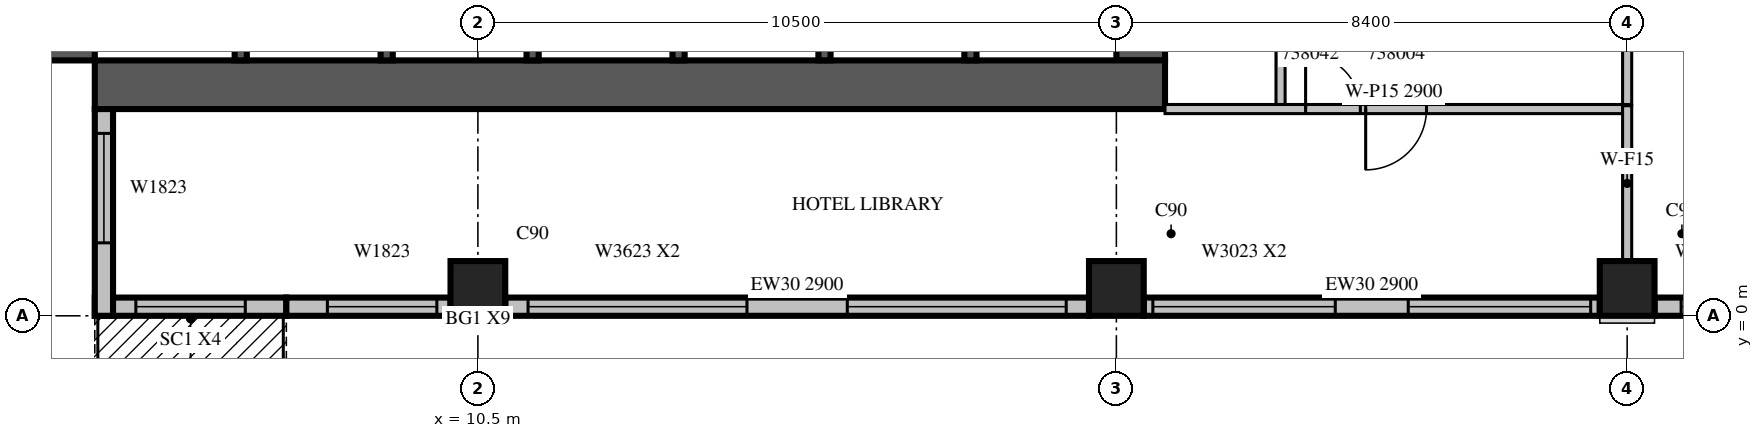
"""IFC4 building model, lengths in metres.
Left out: names, types, materials, properties, quantities, classifications, styles, units other than length and angle.
Written with IfcOpenShell. Run it as: python <this file> out.ifc"""

import sys

from ifc_helpers import new_model, si_unit, direction, frame, frame_2d, origin, origin_2d, place, context, subcontext, project, spatial, rectangle, extrude, source, transform, mapped, element, fill, save


model = new_model("IFC4")
c1 = context("Model", 3, precision=1e-05, world=origin(), true_north=direction((0.0, 1.0)))
c2 = subcontext(c1, "Body", "Model", "MODEL_VIEW")
j1 = project(units=[si_unit("LENGTHUNIT", "METRE"), si_unit("PLANEANGLEUNIT", "RADIAN")], contexts=[c1])
p1 = place(None, origin())
s1 = spatial("IfcSite", under=j1, at=p1, CompositionType="ELEMENT")
p2 = place(p1, origin())
s2 = spatial("IfcBuilding", under=s1, at=p2, CompositionType="ELEMENT")
p3 = place(p2, frame((0.0, 0.0, 177.8)))
s3 = spatial("IfcBuildingStorey", under=s2, at=p3, CompositionType="ELEMENT", Elevation=177.8)
p4 = place(p3, frame((10.5, 0.45, 0.0), z_axis=(0.0, 0.0, 1.0), x_axis=(1.0, 0.0, 0.0)))
e1 = element("IfcColumn", 1, at=p4, inside=s3, PredefinedType="COLUMN", context=c2, shape_type="SweptSolid", body=[
    extrude(rectangle(XDim=0.9, YDim=0.9, at=origin_2d()), origin(), (0.0, 0.0, 1.0), 3.8),
])
m1 = source(origin(), c2, "Body", "SweptSolid", [
    extrude(rectangle(XDim=0.9, YDim=0.9, at=origin_2d()), origin(), (0.0, 0.0, 1.0), 3.8),
])
for number, where, z_axis, x_axis in (
    (2, (21.0, 0.45, 0.0), (0.0, 0.0, 1.0), (1.0, 0.0, 0.0)),
    (3, (29.4, 0.45, 0.0), (0.0, 0.0, 1.0), (1.0, 0.0, 0.0)),
):
    element("IfcColumn", number, at=place(p3, frame(where, z_axis=z_axis, x_axis=x_axis)), inside=s3, PredefinedType="COLUMN", context=c2, shape_type="MappedRepresentation", body=[
        mapped(m1, transform((0.0, 0.0, 0.0), scale=1.0)),
    ])
p5 = place(p3, frame((3.8, 4.2, 0.0), z_axis=(0.0, 0.0, 1.0), x_axis=(0.0, 1.0, 0.0)))
e4 = element("IfcWall", 4, at=p5, inside=s3, PredefinedType="SHEAR", context=c2, shape_type="SweptSolid", body=[
    extrude(rectangle(XDim=17.6, YDim=0.8, at=frame_2d((8.8, 0.0))), origin(), (0.0, 0.0, 1.0), 3.8),
])
m2 = source(origin(), c2, "Body", "SweptSolid", [
    extrude(rectangle(XDim=2.2, YDim=2.1, at=frame_2d((1.1, 1.05))), frame((0.0, 0.41, 0.0), z_axis=(0.0, -1.0, 0.0), x_axis=(1.0, 0.0, 0.0)), (0.0, 0.0, 1.0), 0.82),
])
p6 = place(p5, frame((4.2, 0.0, 0.0)))
e5 = element("IfcOpeningElement", 5, at=p6, cuts=e4, PredefinedType="OPENING", context=c2, shape_type="MappedRepresentation", body=[
    mapped(m2, transform((0.0, 0.0, 0.0), scale=1.0)),
])
p7 = place(p5, frame((10.95, 0.0, 0.0)))
e6 = element("IfcOpeningElement", 6, at=p7, cuts=e4, PredefinedType="OPENING", context=c2, shape_type="SweptSolid", body=[
    extrude(rectangle(XDim=0.9, YDim=2.1, at=frame_2d((0.45, 1.05))), frame((0.0, 0.41, 0.0), z_axis=(0.0, -1.0, 0.0), x_axis=(1.0, 0.0, 0.0)), (0.0, 0.0, 1.0), 0.82),
])
p8 = place(p3, frame((21.4, 4.2, 0.0), z_axis=(0.0, 0.0, 1.0), x_axis=(0.0, 1.0, 0.0)))
e7 = element("IfcWall", 7, at=p8, inside=s3, PredefinedType="SHEAR", context=c2, shape_type="SweptSolid", body=[
    extrude(rectangle(XDim=16.8, YDim=0.8, at=frame_2d((8.4, 0.0))), origin(), (0.0, 0.0, 1.0), 3.8),
])
p9 = place(p8, frame((4.2, 0.0, 0.0)))
e8 = element("IfcOpeningElement", 8, at=p9, cuts=e7, PredefinedType="OPENING", context=c2, shape_type="SweptSolid", body=[
    extrude(rectangle(XDim=2.2, YDim=2.1, at=frame_2d((1.1, 1.05))), frame((0.0, 0.41, 0.0), z_axis=(0.0, -1.0, 0.0), x_axis=(1.0, 0.0, 0.0)), (0.0, 0.0, 1.0), 0.82),
])
m3 = source(origin(), c2, "Body", "SweptSolid", [
    extrude(rectangle(XDim=1.2, YDim=2.1, at=frame_2d((0.6, 1.05))), frame((0.0, 0.41, 0.0), z_axis=(0.0, -1.0, 0.0), x_axis=(1.0, 0.0, 0.0)), (0.0, 0.0, 1.0), 0.82),
])
p10 = place(p8, frame((14.7, 0.0, 0.0)))
e9 = element("IfcOpeningElement", 9, at=p10, cuts=e7, PredefinedType="OPENING", context=c2, shape_type="MappedRepresentation", body=[
    mapped(m3, transform((0.0, 0.0, 0.0), scale=1.0)),
])
m4 = source(origin(), c2, "Body", "SweptSolid", [
    extrude(rectangle(XDim=17.6, YDim=0.8, at=frame_2d((8.8, 0.0))), origin(), (0.0, 0.0, 1.0), 3.8),
])
p11 = place(p3, frame((4.2, 3.8, 0.0), z_axis=(0.0, 0.0, 1.0), x_axis=(1.0, 0.0, 0.0)))
e10 = element("IfcWall", 10, at=p11, inside=s3, PredefinedType="SHEAR", context=c2, shape_type="MappedRepresentation", body=[
    mapped(m4, transform((0.0, 0.0, 0.0), scale=1.0)),
])
p12 = place(p3, frame((4.2, 0.15, 0.0), z_axis=(0.0, 0.0, 1.0), x_axis=(1.0, 0.0, 0.0)))
e11 = element("IfcWall", 11, at=p12, inside=s3, PredefinedType="STANDARD", context=c2, shape_type="SweptSolid", body=[
    extrude(rectangle(XDim=3.15, YDim=0.3, at=frame_2d((1.575, 0.0))), origin(), (0.0, 0.0, 1.0), 3.4),
])
m5 = source(origin(), c2, "Body", "SweptSolid", [
    extrude(rectangle(XDim=1.8, YDim=2.4, at=frame_2d((0.9, 1.2))), frame((0.0, 0.16, 0.0), z_axis=(0.0, -1.0, 0.0), x_axis=(1.0, 0.0, 0.0)), (0.0, 0.0, 1.0), 0.32),
])
p13 = place(p12, frame((0.675, 0.0, 0.0)))
e12 = element("IfcOpeningElement", 12, at=p13, cuts=e11, PredefinedType="OPENING", context=c2, shape_type="MappedRepresentation", body=[
    mapped(m5, transform((0.0, 0.0, 0.0), scale=1.0)),
])
p14 = place(p3, frame((7.35, 0.15, 0.0), z_axis=(0.0, 0.0, 1.0), x_axis=(1.0, 0.0, 0.0)))
e13 = element("IfcWall", 13, at=p14, inside=s3, PredefinedType="STANDARD", context=c2, shape_type="SweptSolid", body=[
    extrude(rectangle(XDim=2.7, YDim=0.3, at=frame_2d((1.35, 0.0))), origin(), (0.0, 0.0, 1.0), 3.4),
])
p15 = place(p14, frame((0.675, 0.0, 0.6)))
e14 = element("IfcOpeningElement", 14, at=p15, cuts=e13, PredefinedType="OPENING", context=c2, shape_type="SweptSolid", body=[
    extrude(rectangle(XDim=1.8, YDim=2.3, at=frame_2d((0.9, 1.15))), frame((0.0, 0.16, 0.0), z_axis=(0.0, -1.0, 0.0), x_axis=(1.0, 0.0, 0.0)), (0.0, 0.0, 1.0), 0.32),
])
p16 = place(p3, frame((10.95, 0.15, 0.0), z_axis=(0.0, 0.0, 1.0), x_axis=(1.0, 0.0, 0.0)))
e15 = element("IfcWall", 15, at=p16, inside=s3, PredefinedType="STANDARD", context=c2, shape_type="SweptSolid", body=[
    extrude(rectangle(XDim=9.6, YDim=0.3, at=frame_2d((4.8, 0.0))), origin(), (0.0, 0.0, 1.0), 2.9),
])
p17 = place(p16, frame((0.375, 0.0, 0.6)))
e16 = element("IfcOpeningElement", 16, at=p17, cuts=e15, PredefinedType="OPENING", context=c2, shape_type="SweptSolid", body=[
    extrude(rectangle(XDim=3.6, YDim=2.3, at=frame_2d((1.8, 1.15))), frame((0.0, 0.16, 0.0), z_axis=(0.0, -1.0, 0.0), x_axis=(1.0, 0.0, 0.0)), (0.0, 0.0, 1.0), 0.32),
])
m6 = source(origin(), c2, "Body", "SweptSolid", [
    extrude(rectangle(XDim=3.6, YDim=2.3, at=frame_2d((1.8, 1.15))), frame((0.0, 0.16, 0.0), z_axis=(0.0, -1.0, 0.0), x_axis=(1.0, 0.0, 0.0)), (0.0, 0.0, 1.0), 0.32),
])
p18 = place(p16, frame((5.625, 0.0, 0.6)))
e17 = element("IfcOpeningElement", 17, at=p18, cuts=e15, PredefinedType="OPENING", context=c2, shape_type="MappedRepresentation", body=[
    mapped(m6, transform((0.0, 0.0, 0.0), scale=1.0)),
])
p19 = place(p3, frame((21.45, 0.15, 0.0), z_axis=(0.0, 0.0, 1.0), x_axis=(1.0, 0.0, 0.0)))
e18 = element("IfcWall", 18, at=p19, inside=s3, PredefinedType="STANDARD", context=c2, shape_type="SweptSolid", body=[
    extrude(rectangle(XDim=7.5, YDim=0.3, at=frame_2d((3.75, 0.0))), origin(), (0.0, 0.0, 1.0), 2.9),
])
p20 = place(p19, frame((0.15, 0.0, 0.6)))
e19 = element("IfcOpeningElement", 19, at=p20, cuts=e18, PredefinedType="OPENING", context=c2, shape_type="SweptSolid", body=[
    extrude(rectangle(XDim=3.0, YDim=2.3, at=frame_2d((1.5, 1.15))), frame((0.0, 0.16, 0.0), z_axis=(0.0, -1.0, 0.0), x_axis=(1.0, 0.0, 0.0)), (0.0, 0.0, 1.0), 0.32),
])
m7 = source(origin(), c2, "Body", "SweptSolid", [
    extrude(rectangle(XDim=3.0, YDim=2.3, at=frame_2d((1.5, 1.15))), frame((0.0, 0.16, 0.0), z_axis=(0.0, -1.0, 0.0), x_axis=(1.0, 0.0, 0.0)), (0.0, 0.0, 1.0), 0.32),
])
p21 = place(p19, frame((4.35, 0.0, 0.6)))
e20 = element("IfcOpeningElement", 20, at=p21, cuts=e18, PredefinedType="OPENING", context=c2, shape_type="MappedRepresentation", body=[
    mapped(m7, transform((0.0, 0.0, 0.0), scale=1.0)),
])
p22 = place(p3, frame((29.85, 0.15, 0.0), z_axis=(0.0, 0.0, 1.0), x_axis=(1.0, 0.0, 0.0)))
e21 = element("IfcWall", 21, at=p22, inside=s3, PredefinedType="STANDARD", context=c2, shape_type="SweptSolid", body=[
    extrude(rectangle(XDim=7.5, YDim=0.3, at=frame_2d((3.75, 0.0))), origin(), (0.0, 0.0, 1.0), 3.4),
])
p23 = place(p22, frame((0.438, 0.0, 0.6)))
e22 = element("IfcOpeningElement", 22, at=p23, cuts=e21, PredefinedType="OPENING", context=c2, shape_type="SweptSolid", body=[
    extrude(rectangle(XDim=1.2, YDim=2.3, at=frame_2d((0.6, 1.15))), frame((0.0, 0.16, 0.0), z_axis=(0.0, -1.0, 0.0), x_axis=(1.0, 0.0, 0.0)), (0.0, 0.0, 1.0), 0.32),
])
m8 = source(origin(), c2, "Body", "SweptSolid", [
    extrude(rectangle(XDim=1.2, YDim=2.3, at=frame_2d((0.6, 1.15))), frame((0.0, 0.16, 0.0), z_axis=(0.0, -1.0, 0.0), x_axis=(1.0, 0.0, 0.0)), (0.0, 0.0, 1.0), 0.32),
])
p24 = place(p22, frame((5.963, 0.0, 0.6)))
e23 = element("IfcOpeningElement", 23, at=p24, cuts=e21, PredefinedType="OPENING", context=c2, shape_type="MappedRepresentation", body=[
    mapped(m8, transform((0.0, 0.0, 0.0), scale=1.0)),
])
m9 = source(origin(), c2, "Body", "SweptSolid", [
    extrude(rectangle(XDim=3.4, YDim=0.3, at=frame_2d((1.7, 0.0))), origin(), (0.0, 0.0, 1.0), 3.4),
])
p25 = place(p3, frame((4.35, 3.4, 0.0), z_axis=(0.0, 0.0, 1.0), x_axis=(0.0, -1.0, 0.0)))
e24 = element("IfcWall", 24, at=p25, inside=s3, PredefinedType="STANDARD", context=c2, shape_type="MappedRepresentation", body=[
    mapped(m9, transform((0.0, 0.0, 0.0), scale=1.0)),
])
m10 = source(origin(), c2, "Body", "SweptSolid", [
    extrude(rectangle(XDim=1.8, YDim=2.3, at=frame_2d((0.9, 1.15))), frame((0.0, 0.16, 0.0), z_axis=(0.0, -1.0, 0.0), x_axis=(1.0, 0.0, 0.0)), (0.0, 0.0, 1.0), 0.32),
])
p26 = place(p25, frame((0.4, 0.0, 0.6)))
e25 = element("IfcOpeningElement", 25, at=p26, cuts=e24, PredefinedType="OPENING", context=c2, shape_type="MappedRepresentation", body=[
    mapped(m10, transform((0.0, 0.0, 0.0), scale=1.0)),
])
p27 = place(p3, frame((6.6, 4.2, 0.0), z_axis=(0.0, 0.0, 1.0), x_axis=(0.0, 1.0, 0.0)))
e26 = element("IfcWall", 26, at=p27, inside=s3, PredefinedType="SOLIDWALL", context=c2, shape_type="SweptSolid", body=[
    extrude(rectangle(XDim=3.1, YDim=0.2, at=frame_2d((1.55, 0.0))), origin(), (0.0, 0.0, 1.0), 3.8),
])
m11 = source(origin(), c2, "Body", "SweptSolid", [
    extrude(rectangle(XDim=3.1, YDim=0.2, at=frame_2d((1.55, 0.0))), origin(), (0.0, 0.0, 1.0), 3.8),
])
for number, where, z_axis, x_axis in (
    (27, (9.0, 4.2, 0.0), (0.0, 0.0, 1.0), (0.0, 1.0, 0.0)),
    (28, (11.4, 4.2, 0.0), (0.0, 0.0, 1.0), (0.0, 1.0, 0.0)),
):
    element("IfcWall", number, at=place(p3, frame(where, z_axis=z_axis, x_axis=x_axis)), inside=s3, PredefinedType="SOLIDWALL", context=c2, shape_type="MappedRepresentation", body=[
        mapped(m11, transform((0.0, 0.0, 0.0), scale=1.0)),
    ])
p28 = place(p3, frame((13.8, 4.2, 0.0), z_axis=(0.0, 0.0, 1.0), x_axis=(0.0, 1.0, 0.0)))
e29 = element("IfcWall", 29, at=p28, inside=s3, PredefinedType="SOLIDWALL", context=c2, shape_type="SweptSolid", body=[
    extrude(rectangle(XDim=3.1, YDim=0.2, at=frame_2d((1.55, 0.0))), origin(), (0.0, 0.0, 1.0), 3.4),
])
m12 = source(origin(), c2, "Body", "SweptSolid", [
    extrude(rectangle(XDim=3.1, YDim=0.2, at=frame_2d((1.55, 0.0))), origin(), (0.0, 0.0, 1.0), 3.4),
])
for number, where, z_axis, x_axis in (
    (30, (16.2, 4.2, 0.0), (0.0, 0.0, 1.0), (0.0, 1.0, 0.0)),
    (31, (18.6, 4.2, 0.0), (0.0, 0.0, 1.0), (0.0, 1.0, 0.0)),
):
    element("IfcWall", number, at=place(p3, frame(where, z_axis=z_axis, x_axis=x_axis)), inside=s3, PredefinedType="SOLIDWALL", context=c2, shape_type="MappedRepresentation", body=[
        mapped(m12, transform((0.0, 0.0, 0.0), scale=1.0)),
    ])
p29 = place(p3, frame((23.7, 15.0, 0.0), z_axis=(0.0, 0.0, 1.0), x_axis=(0.0, -1.0, 0.0)))
e32 = element("IfcWall", 32, at=p29, inside=s3, PredefinedType="PARTITIONING", context=c2, shape_type="SweptSolid", body=[
    extrude(rectangle(XDim=11.525, YDim=0.15, at=frame_2d((5.763, 0.0))), origin(), (0.0, 0.0, 1.0), 2.4),
])
m13 = source(origin(), c2, "Body", "SweptSolid", [
    extrude(rectangle(XDim=0.9, YDim=2.1, at=frame_2d((0.45, 1.05))), frame((0.0, 0.085, 0.0), z_axis=(0.0, -1.0, 0.0), x_axis=(1.0, 0.0, 0.0)), (0.0, 0.0, 1.0), 0.17),
])
p30 = place(p29, frame((9.363, 0.0, 0.0)))
e33 = element("IfcOpeningElement", 33, at=p30, cuts=e32, PredefinedType="OPENING", context=c2, shape_type="MappedRepresentation", body=[
    mapped(m13, transform((0.0, 0.0, 0.0), scale=1.0)),
])
p31 = place(p29, frame((2.725, 0.0, 0.0)))
e34 = element("IfcOpeningElement", 34, at=p31, cuts=e32, PredefinedType="OPENING", context=c2, shape_type="MappedRepresentation", body=[
    mapped(m13, transform((0.0, 0.0, 0.0), scale=1.0)),
])
p32 = place(p3, frame((29.4, 3.475, 0.0), z_axis=(0.0, 0.0, 1.0), x_axis=(0.0, 1.0, 0.0)))
e35 = element("IfcWall", 35, at=p32, inside=s3, PredefinedType="PARTITIONING", context=c2, shape_type="SweptSolid", body=[
    extrude(rectangle(XDim=6.576, YDim=0.15, at=frame_2d((3.288, 0.0))), origin(), (0.0, 0.0, 1.0), 3.4),
])
p33 = place(p3, frame((21.8, 3.4, 0.0), z_axis=(0.0, 0.0, 1.0), x_axis=(1.0, 0.0, 0.0)))
e36 = element("IfcWall", 36, at=p33, inside=s3, PredefinedType="PARTITIONING", context=c2, shape_type="SweptSolid", body=[
    extrude(rectangle(XDim=7.525, YDim=0.15, at=frame_2d((3.763, 0.0))), origin(), (0.0, 0.0, 1.0), 2.9),
])
m14 = source(origin(), c2, "Body", "SweptSolid", [
    extrude(rectangle(XDim=1.0, YDim=2.1, at=frame_2d((0.5, 1.05))), frame((0.0, 0.085, 0.0), z_axis=(0.0, -1.0, 0.0), x_axis=(1.0, 0.0, 0.0)), (0.0, 0.0, 1.0), 0.17),
])
p34 = place(p33, frame((3.3, 0.0, 0.0)))
e37 = element("IfcOpeningElement", 37, at=p34, cuts=e36, PredefinedType="OPENING", context=c2, shape_type="MappedRepresentation", body=[
    mapped(m14, transform((0.0, 0.0, 0.0), scale=1.0)),
])
p35 = place(p33, frame((2.312, 0.0, 0.0)))
e38 = element("IfcOpeningElement", 38, at=p35, cuts=e36, PredefinedType="OPENING", context=c2, shape_type="MappedRepresentation", body=[
    mapped(m13, transform((0.0, 0.0, 0.0), scale=1.0)),
])
p36 = place(p3, frame((29.4, 0.899, 0.0), z_axis=(0.0, 0.0, 1.0), x_axis=(0.0, 1.0, 0.0)))
e39 = element("IfcWall", 39, at=p36, inside=s3, PredefinedType="PARTITIONING", context=c2, shape_type="SweptSolid", body=[
    extrude(rectangle(XDim=2.556, YDim=0.15, at=frame_2d((1.278, 0.0))), origin(), (0.0, 0.0, 1.0), 3.4),
])
m15 = source(origin(), c2, "Body", "SweptSolid", [
    extrude(rectangle(XDim=1.8, YDim=2.4, at=frame_2d((0.9, 1.2))), frame((0.0, 0.025, 0.0), z_axis=(0.0, -1.0, 0.0), x_axis=(1.0, 0.0, 0.0)), (0.0, 0.0, 1.0), 0.05),
])
p37 = place(p13, origin())
e40 = element("IfcDoor", 40, at=p37, inside=s3, OperationType="SLIDING_TO_LEFT", PredefinedType="DOOR", context=c2, shape_type="MappedRepresentation", body=[
    mapped(m15, transform((0.0, 0.0, 0.0), scale=1.0)),
])
fill(e12, e40)
p38 = place(p15, origin())
e41 = element("IfcWindow", 41, at=p38, inside=s3, PartitioningType="SINGLE_PANEL", PredefinedType="WINDOW", context=c2, shape_type="SweptSolid", body=[
    extrude(rectangle(XDim=1.8, YDim=2.3, at=frame_2d((0.9, 1.15))), frame((0.0, 0.03, 0.0), z_axis=(0.0, -1.0, 0.0), x_axis=(1.0, 0.0, 0.0)), (0.0, 0.0, 1.0), 0.06),
])
fill(e14, e41)
p39 = place(p17, origin())
e42 = element("IfcWindow", 42, at=p39, inside=s3, PartitioningType="SINGLE_PANEL", PredefinedType="WINDOW", context=c2, shape_type="SweptSolid", body=[
    extrude(rectangle(XDim=3.6, YDim=2.3, at=frame_2d((1.8, 1.15))), frame((0.0, 0.03, 0.0), z_axis=(0.0, -1.0, 0.0), x_axis=(1.0, 0.0, 0.0)), (0.0, 0.0, 1.0), 0.06),
])
fill(e16, e42)
m16 = source(origin(), c2, "Body", "SweptSolid", [
    extrude(rectangle(XDim=3.6, YDim=2.3, at=frame_2d((1.8, 1.15))), frame((0.0, 0.03, 0.0), z_axis=(0.0, -1.0, 0.0), x_axis=(1.0, 0.0, 0.0)), (0.0, 0.0, 1.0), 0.06),
])
p40 = place(p18, origin())
e43 = element("IfcWindow", 43, at=p40, inside=s3, PartitioningType="SINGLE_PANEL", PredefinedType="WINDOW", context=c2, shape_type="MappedRepresentation", body=[
    mapped(m16, transform((0.0, 0.0, 0.0), scale=1.0)),
])
fill(e17, e43)
p41 = place(p20, origin())
e44 = element("IfcWindow", 44, at=p41, inside=s3, PartitioningType="SINGLE_PANEL", PredefinedType="WINDOW", context=c2, shape_type="SweptSolid", body=[
    extrude(rectangle(XDim=3.0, YDim=2.3, at=frame_2d((1.5, 1.15))), frame((0.0, 0.03, 0.0), z_axis=(0.0, -1.0, 0.0), x_axis=(1.0, 0.0, 0.0)), (0.0, 0.0, 1.0), 0.06),
])
fill(e19, e44)
m17 = source(origin(), c2, "Body", "SweptSolid", [
    extrude(rectangle(XDim=3.0, YDim=2.3, at=frame_2d((1.5, 1.15))), frame((0.0, 0.03, 0.0), z_axis=(0.0, -1.0, 0.0), x_axis=(1.0, 0.0, 0.0)), (0.0, 0.0, 1.0), 0.06),
])
p42 = place(p21, origin())
e45 = element("IfcWindow", 45, at=p42, inside=s3, PartitioningType="SINGLE_PANEL", PredefinedType="WINDOW", context=c2, shape_type="MappedRepresentation", body=[
    mapped(m17, transform((0.0, 0.0, 0.0), scale=1.0)),
])
fill(e20, e45)
p43 = place(p23, origin())
e46 = element("IfcWindow", 46, at=p43, inside=s3, PartitioningType="SINGLE_PANEL", PredefinedType="WINDOW", context=c2, shape_type="SweptSolid", body=[
    extrude(rectangle(XDim=1.2, YDim=2.3, at=frame_2d((0.6, 1.15))), frame((0.0, 0.03, 0.0), z_axis=(0.0, -1.0, 0.0), x_axis=(1.0, 0.0, 0.0)), (0.0, 0.0, 1.0), 0.06),
])
fill(e22, e46)
m18 = source(origin(), c2, "Body", "SweptSolid", [
    extrude(rectangle(XDim=1.8, YDim=2.3, at=frame_2d((0.9, 1.15))), frame((0.0, 0.03, 0.0), z_axis=(0.0, -1.0, 0.0), x_axis=(1.0, 0.0, 0.0)), (0.0, 0.0, 1.0), 0.06),
])
p44 = place(p26, origin())
e47 = element("IfcWindow", 47, at=p44, inside=s3, PartitioningType="SINGLE_PANEL", PredefinedType="WINDOW", context=c2, shape_type="MappedRepresentation", body=[
    mapped(m18, transform((0.0, 0.0, 0.0), scale=1.0)),
])
fill(e25, e47)
m19 = source(origin(), c2, "Body", "SweptSolid", [
    extrude(rectangle(XDim=1.0, YDim=2.1, at=frame_2d((0.5, 1.05))), frame((0.0, 0.025, 0.0), z_axis=(0.0, -1.0, 0.0), x_axis=(1.0, 0.0, 0.0)), (0.0, 0.0, 1.0), 0.05),
])
p45 = place(p34, origin())
e48 = element("IfcDoor", 48, at=p45, inside=s3, OperationType="SINGLE_SWING_RIGHT", PredefinedType="DOOR", context=c2, shape_type="MappedRepresentation", body=[
    mapped(m19, transform((0.0, 0.0, 0.0), scale=1.0)),
])
fill(e37, e48)
m20 = source(origin(), c2, "Body", "SweptSolid", [
    extrude(rectangle(XDim=0.9, YDim=2.1, at=frame_2d((0.45, 1.05))), frame((0.0, 0.025, 0.0), z_axis=(0.0, -1.0, 0.0), x_axis=(1.0, 0.0, 0.0)), (0.0, 0.0, 1.0), 0.05),
])
p46 = place(p35, origin())
e49 = element("IfcDoor", 49, at=p46, inside=s3, OperationType="SINGLE_SWING_LEFT", PredefinedType="DOOR", context=c2, shape_type="MappedRepresentation", body=[
    mapped(m20, transform((0.0, 0.0, 0.0), scale=1.0)),
])
fill(e38, e49)
save(model, sys.argv[1])
